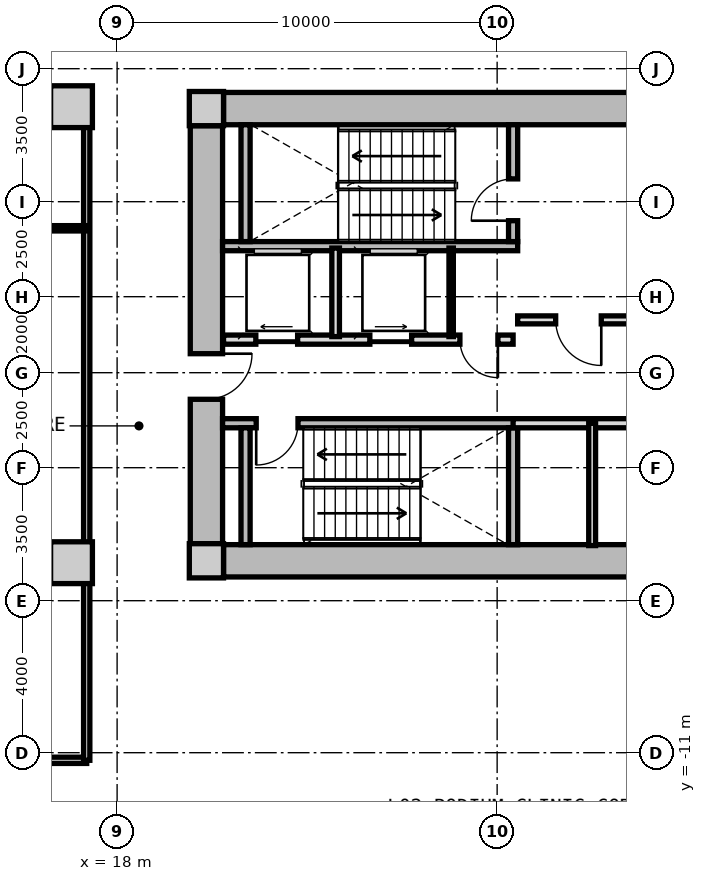
"""IFC4 building model, lengths in metres.
Left out: names, types, materials, properties, quantities, classifications, styles, units other than length and angle.
Written with IfcOpenShell. Run it as: python <this file> out.ifc"""

import sys

from ifc_helpers import new_model, si_unit, direction, frame, frame_2d, origin, origin_2d, place, context, subcontext, project, spatial, rectangle, extrude, source, transform, mapped, element, fill, save


model = new_model("IFC4")
c1 = context("Model", 3, precision=1e-05, world=origin(), true_north=direction((0.0, 1.0)))
c2 = subcontext(c1, "Body", "Model", "MODEL_VIEW")
j1 = project(units=[si_unit("LENGTHUNIT", "METRE"), si_unit("PLANEANGLEUNIT", "RADIAN")], contexts=[c1])
p1 = place(None, origin())
s1 = spatial("IfcSite", under=j1, at=p1, CompositionType="ELEMENT")
p2 = place(p1, origin())
s2 = spatial("IfcBuilding", under=s1, at=p2, CompositionType="ELEMENT")
p3 = place(p2, frame((0.0, 0.0, 8.4)))
s3 = spatial("IfcBuildingStorey", under=s2, at=p3, CompositionType="ELEMENT", Elevation=8.4)
m1 = source(origin(), c2, "Body", "SweptSolid", [
    extrude(rectangle(XDim=0.9, YDim=0.9, at=origin_2d()), origin(), (0.0, 0.0, 1.0), 4.2),
])
for number, where, z_axis, x_axis in (
    (1, (20.35, -5.95, 0.0), (0.0, 0.0, 1.0), (1.0, 0.0, 0.0)),
    (2, (20.35, 5.95, 0.0), (0.0, 0.0, 1.0), (1.0, 0.0, 0.0)),
):
    element("IfcColumn", number, at=place(p3, frame(where, z_axis=z_axis, x_axis=x_axis)), inside=s3, PredefinedType="COLUMN", context=c2, shape_type="MappedRepresentation", body=[
        mapped(m1, transform((0.0, 0.0, 0.0), x_axis=(1.0, 0.0, 0.0), y_axis=(0.0, 1.0, 0.0), z_axis=(0.0, 0.0, 1.0), scale=1.0)),
    ])
m2 = source(origin(), c2, "Body", "SweptSolid", [
    extrude(rectangle(XDim=14.4, YDim=0.85, at=frame_2d((7.2, 0.0))), origin(), (0.0, 0.0, 1.0), 3.88),
])
for number, where, z_axis, x_axis in (
    (3, (20.8, 5.95, 0.0), (0.0, 0.0, 1.0), (1.0, 0.0, 0.0)),
    (4, (35.2, -5.95, 0.0), (0.0, 0.0, 1.0), (-1.0, 0.0, 0.0)),
):
    element("IfcWall", number, at=place(p3, frame(where, z_axis=z_axis, x_axis=x_axis)), inside=s3, PredefinedType="SHEAR", context=c2, shape_type="MappedRepresentation", body=[
        mapped(m2, transform((0.0, 0.0, 0.0), x_axis=(1.0, 0.0, 0.0), y_axis=(0.0, 1.0, 0.0), z_axis=(0.0, 0.0, 1.0), scale=1.0)),
    ])
m3 = source(origin(), c2, "Body", "SweptSolid", [
    extrude(rectangle(XDim=11.0, YDim=0.85, at=frame_2d((5.5, 0.0))), origin(), (0.0, 0.0, 1.0), 3.88),
])
p4 = place(p3, frame((20.35, -5.5, 0.0), z_axis=(0.0, 0.0, 1.0), x_axis=(0.0, 1.0, 0.0)))
e5 = element("IfcWall", 5, at=p4, inside=s3, PredefinedType="SHEAR", context=c2, shape_type="MappedRepresentation", body=[
    mapped(m3, transform((0.0, 0.0, 0.0), x_axis=(1.0, 0.0, 0.0), y_axis=(0.0, 1.0, 0.0), z_axis=(0.0, 0.0, 1.0), scale=1.0)),
])
p5 = place(p4, frame((3.8, 0.0, 0.0)))
e6 = element("IfcOpeningElement", 6, at=p5, cuts=e5, PredefinedType="OPENING", context=c2, shape_type="SweptSolid", body=[
    extrude(rectangle(XDim=1.2, YDim=2.15, at=frame_2d((0.6, 1.075))), frame((0.0, 0.435, 0.0), z_axis=(0.0, -1.0, 0.0), x_axis=(1.0, 0.0, 0.0)), (0.0, 0.0, 1.0), 0.87),
])
m4 = source(origin(), c2, "Body", "SweptSolid", [
    extrude(rectangle(XDim=1.1, YDim=1.1, at=origin_2d()), origin(), (0.0, 0.0, 1.0), 4.2),
])
for number, where, z_axis, x_axis in (
    (7, (16.8, -6.0, 0.0), (0.0, 0.0, 1.0), (1.0, 0.0, 0.0)),
    (8, (16.8, 6.0, 0.0), (0.0, 0.0, 1.0), (1.0, 0.0, 0.0)),
):
    element("IfcColumn", number, at=place(p3, frame(where, z_axis=z_axis, x_axis=x_axis)), inside=s3, PredefinedType="COLUMN", context=c2, shape_type="MappedRepresentation", body=[
        mapped(m4, transform((0.0, 0.0, 0.0), x_axis=(1.0, 0.0, 0.0), y_axis=(0.0, 1.0, 0.0), z_axis=(0.0, 0.0, 1.0), scale=1.0)),
    ])
m5 = source(origin(), c2, "Body", "SweptSolid", [
    extrude(rectangle(XDim=7.765, YDim=0.24, at=frame_2d((3.883, 0.0))), origin(), (0.0, 0.0, 1.0), 3.88),
])
p6 = place(p3, frame((20.775, 2.33, 0.0), z_axis=(0.0, 0.0, 1.0), x_axis=(1.0, 0.0, 0.0)))
e9 = element("IfcWall", 9, at=p6, inside=s3, PredefinedType="PARTITIONING", context=c2, shape_type="MappedRepresentation", body=[
    mapped(m5, transform((0.0, 0.0, 0.0), x_axis=(1.0, 0.0, 0.0), y_axis=(0.0, 1.0, 0.0), z_axis=(0.0, 0.0, 1.0), scale=1.0)),
])
m6 = source(origin(), c2, "Body", "SweptSolid", [
    extrude(rectangle(XDim=3.075, YDim=0.24, at=frame_2d((1.538, 0.0))), origin(), (0.0, 0.0, 1.0), 3.88),
])
p7 = place(p3, frame((21.38, 2.45, 0.0), z_axis=(0.0, 0.0, 1.0), x_axis=(0.0, 1.0, 0.0)))
e10 = element("IfcWall", 10, at=p7, inside=s3, PredefinedType="PARTITIONING", context=c2, shape_type="MappedRepresentation", body=[
    mapped(m6, transform((0.0, 0.0, 0.0), x_axis=(1.0, 0.0, 0.0), y_axis=(0.0, 1.0, 0.0), z_axis=(0.0, 0.0, 1.0), scale=1.0)),
])
p8 = place(p3, frame((28.42, 2.45, 0.0), z_axis=(0.0, 0.0, 1.0), x_axis=(0.0, 1.0, 0.0)))
e11 = element("IfcWall", 11, at=p8, inside=s3, PredefinedType="PARTITIONING", context=c2, shape_type="MappedRepresentation", body=[
    mapped(m6, transform((0.0, 0.0, 0.0), x_axis=(1.0, 0.0, 0.0), y_axis=(0.0, 1.0, 0.0), z_axis=(0.0, 0.0, 1.0), scale=1.0)),
])
p9 = place(p8, frame((0.55, 0.0, 0.0)))
e12 = element("IfcOpeningElement", 12, at=p9, cuts=e11, PredefinedType="OPENING", context=c2, shape_type="SweptSolid", body=[
    extrude(rectangle(XDim=1.1, YDim=2.15, at=frame_2d((0.55, 1.075))), frame((0.0, 0.13, 0.0), z_axis=(0.0, -1.0, 0.0), x_axis=(1.0, 0.0, 0.0)), (0.0, 0.0, 1.0), 0.26),
])
p10 = place(p3, frame((20.775, -2.33, 0.0), z_axis=(0.0, 0.0, 1.0), x_axis=(1.0, 0.0, 0.0)))
e13 = element("IfcWall", 13, at=p10, inside=s3, PredefinedType="PARTITIONING", context=c2, shape_type="MappedRepresentation", body=[
    mapped(m5, transform((0.0, 0.0, 0.0), x_axis=(1.0, 0.0, 0.0), y_axis=(0.0, 1.0, 0.0), z_axis=(0.0, 0.0, 1.0), scale=1.0)),
])
p11 = place(p10, frame((0.885, 0.0, 0.0)))
e14 = element("IfcOpeningElement", 14, at=p11, cuts=e13, PredefinedType="OPENING", context=c2, shape_type="SweptSolid", body=[
    extrude(rectangle(XDim=1.1, YDim=2.15, at=frame_2d((0.55, 1.075))), frame((0.0, 0.13, 0.0), z_axis=(0.0, -1.0, 0.0), x_axis=(1.0, 0.0, 0.0)), (0.0, 0.0, 1.0), 0.26),
])
for number, where, z_axis, x_axis in (
    (15, (21.38, -5.525, 0.0), (0.0, 0.0, 1.0), (0.0, 1.0, 0.0)),
    (16, (28.42, -5.525, 0.0), (0.0, 0.0, 1.0), (0.0, 1.0, 0.0)),
):
    element("IfcWall", number, at=place(p3, frame(where, z_axis=z_axis, x_axis=x_axis)), inside=s3, PredefinedType="PARTITIONING", context=c2, shape_type="MappedRepresentation", body=[
        mapped(m6, transform((0.0, 0.0, 0.0), x_axis=(1.0, 0.0, 0.0), y_axis=(0.0, 1.0, 0.0), z_axis=(0.0, 0.0, 1.0), scale=1.0)),
    ])
m7 = source(origin(), c2, "Body", "SweptSolid", [
    extrude(rectangle(XDim=6.66, YDim=0.21, at=frame_2d((3.33, 0.0))), origin(), (0.0, 0.0, 1.0), 3.865),
])
p12 = place(p3, frame((28.54, 0.39, 0.0), z_axis=(0.0, 0.0, 1.0), x_axis=(1.0, 0.0, 0.0)))
e17 = element("IfcWall", 17, at=p12, inside=s3, PredefinedType="PARTITIONING", context=c2, shape_type="MappedRepresentation", body=[
    mapped(m7, transform((0.0, 0.0, 0.0), x_axis=(1.0, 0.0, 0.0), y_axis=(0.0, 1.0, 0.0), z_axis=(0.0, 0.0, 1.0), scale=1.0)),
])
p13 = place(p12, frame((1.0, 0.0, 0.0)))
e18 = element("IfcOpeningElement", 18, at=p13, cuts=e17, PredefinedType="OPENING", context=c2, shape_type="SweptSolid", body=[
    extrude(rectangle(XDim=1.2, YDim=2.15, at=frame_2d((0.6, 1.075))), frame((0.0, 0.115, 0.0), z_axis=(0.0, -1.0, 0.0), x_axis=(1.0, 0.0, 0.0)), (0.0, 0.0, 1.0), 0.23),
])
m8 = source(origin(), c2, "Body", "SweptSolid", [
    extrude(rectangle(XDim=7.62, YDim=0.24, at=frame_2d((3.81, 0.0))), origin(), (0.0, 0.0, 1.0), 3.865),
])
p14 = place(p3, frame((20.8, -0.13, 0.0), z_axis=(0.0, 0.0, 1.0), x_axis=(1.0, 0.0, 0.0)))
e19 = element("IfcWall", 19, at=p14, inside=s3, PredefinedType="PARTITIONING", context=c2, shape_type="MappedRepresentation", body=[
    mapped(m8, transform((0.0, 0.0, 0.0), x_axis=(1.0, 0.0, 0.0), y_axis=(0.0, 1.0, 0.0), z_axis=(0.0, 0.0, 1.0), scale=1.0)),
])
p15 = place(p14, frame((6.22, 0.0, 0.0)))
e20 = element("IfcOpeningElement", 20, at=p15, cuts=e19, PredefinedType="OPENING", context=c2, shape_type="SweptSolid", body=[
    extrude(rectangle(XDim=1.0, YDim=2.1, at=frame_2d((0.5, 1.05))), frame((0.0, 0.13, 0.0), z_axis=(0.0, -1.0, 0.0), x_axis=(1.0, 0.0, 0.0)), (0.0, 0.0, 1.0), 0.26),
])
p16 = place(p14, frame((0.85, 0.0, 0.0)))
e21 = element("IfcOpeningElement", 21, at=p16, cuts=e19, PredefinedType="OPENING", context=c2, shape_type="SweptSolid", body=[
    extrude(rectangle(XDim=1.1, YDim=2.2, at=frame_2d((0.55, 1.1))), frame((0.0, 0.13, 0.0), z_axis=(0.0, -1.0, 0.0), x_axis=(1.0, 0.0, 0.0)), (0.0, 0.0, 1.0), 0.26),
])
p17 = place(p14, frame((3.85, 0.0, 0.0)))
e22 = element("IfcOpeningElement", 22, at=p17, cuts=e19, PredefinedType="OPENING", context=c2, shape_type="SweptSolid", body=[
    extrude(rectangle(XDim=1.1, YDim=2.2, at=frame_2d((0.55, 1.1))), frame((0.0, 0.13, 0.0), z_axis=(0.0, -1.0, 0.0), x_axis=(1.0, 0.0, 0.0)), (0.0, 0.0, 1.0), 0.26),
])
m9 = source(origin(), c2, "Body", "SweptSolid", [
    extrude(rectangle(XDim=2.33, YDim=0.115, at=frame_2d((1.165, 0.0))), origin(), (0.0, 0.0, 1.0), 3.865),
])
p18 = place(p3, frame((26.79, -0.05, 0.0), z_axis=(0.0, 0.0, 1.0), x_axis=(0.0, 1.0, 0.0)))
e23 = element("IfcWall", 23, at=p18, inside=s3, PredefinedType="PARTITIONING", context=c2, shape_type="MappedRepresentation", body=[
    mapped(m9, transform((0.0, 0.0, 0.0), x_axis=(1.0, 0.0, 0.0), y_axis=(0.0, 1.0, 0.0), z_axis=(0.0, 0.0, 1.0), scale=1.0)),
])
m10 = source(origin(), c2, "Body", "SweptSolid", [
    extrude(rectangle(XDim=2.33, YDim=0.2, at=frame_2d((1.165, 0.0))), origin(), (0.0, 0.0, 1.0), 3.865),
])
p19 = place(p3, frame((23.75, -0.05, 0.0), z_axis=(0.0, 0.0, 1.0), x_axis=(0.0, 1.0, 0.0)))
e24 = element("IfcWall", 24, at=p19, inside=s3, PredefinedType="PARTITIONING", context=c2, shape_type="MappedRepresentation", body=[
    mapped(m10, transform((0.0, 0.0, 0.0), x_axis=(1.0, 0.0, 0.0), y_axis=(0.0, 1.0, 0.0), z_axis=(0.0, 0.0, 1.0), scale=1.0)),
])
m11 = source(origin(), c2, "Body", "SweptSolid", [
    extrude(rectangle(XDim=4.13, YDim=0.24, at=frame_2d((2.065, 0.0))), origin(), (0.0, 0.0, 1.0), 3.865),
])
p20 = place(p3, frame((28.42, -2.33, 0.0), z_axis=(0.0, 0.0, 1.0), x_axis=(1.0, 0.0, 0.0)))
e25 = element("IfcWall", 25, at=p20, inside=s3, PredefinedType="PARTITIONING", context=c2, shape_type="MappedRepresentation", body=[
    mapped(m11, transform((0.0, 0.0, 0.0), x_axis=(1.0, 0.0, 0.0), y_axis=(0.0, 1.0, 0.0), z_axis=(0.0, 0.0, 1.0), scale=1.0)),
])
m12 = source(origin(), c2, "Body", "SweptSolid", [
    extrude(rectangle(XDim=3.22, YDim=0.18, at=frame_2d((1.61, 0.0))), origin(), (0.0, 0.0, 1.0), 3.865),
])
p21 = place(p3, frame((30.5, -5.55, 0.0), z_axis=(0.0, 0.0, 1.0), x_axis=(0.0, 1.0, 0.0)))
e26 = element("IfcWall", 26, at=p21, inside=s3, PredefinedType="PARTITIONING", context=c2, shape_type="MappedRepresentation", body=[
    mapped(m12, transform((0.0, 0.0, 0.0), x_axis=(1.0, 0.0, 0.0), y_axis=(0.0, 1.0, 0.0), z_axis=(0.0, 0.0, 1.0), scale=1.0)),
])
m13 = source(origin(), c2, "Body", "SweptSolid", [
    extrude(rectangle(XDim=34.4, YDim=0.165, at=frame_2d((17.2, 0.0))), origin(), (0.0, 0.0, 1.0), 3.865),
])
p22 = place(p3, frame((-17.2, -11.2, 0.0), z_axis=(0.0, 0.0, 1.0), x_axis=(1.0, 0.0, 0.0)))
e27 = element("IfcWall", 27, at=p22, inside=s3, PredefinedType="PARTITIONING", context=c2, shape_type="MappedRepresentation", body=[
    mapped(m13, transform((0.0, 0.0, 0.0), x_axis=(1.0, 0.0, 0.0), y_axis=(0.0, 1.0, 0.0), z_axis=(0.0, 0.0, 1.0), scale=1.0)),
])
p23 = place(p22, frame((4.2, 0.0, 0.0)))
e28 = element("IfcOpeningElement", 28, at=p23, cuts=e27, PredefinedType="OPENING", context=c2, shape_type="SweptSolid", body=[
    extrude(rectangle(XDim=1.25, YDim=2.2, at=frame_2d((0.625, 1.1))), frame((0.0, 0.093, 0.0), z_axis=(0.0, -1.0, 0.0), x_axis=(1.0, 0.0, 0.0)), (0.0, 0.0, 1.0), 0.185),
])
p24 = place(p22, frame((16.1, 0.0, 0.0)))
e29 = element("IfcOpeningElement", 29, at=p24, cuts=e27, PredefinedType="OPENING", context=c2, shape_type="SweptSolid", body=[
    extrude(rectangle(XDim=2.2, YDim=2.4, at=frame_2d((1.1, 1.2))), frame((0.0, 0.093, 0.0), z_axis=(0.0, -1.0, 0.0), x_axis=(1.0, 0.0, 0.0)), (0.0, 0.0, 1.0), 0.185),
])
p25 = place(p22, frame((27.5, 0.0, 0.0)))
e30 = element("IfcOpeningElement", 30, at=p25, cuts=e27, PredefinedType="OPENING", context=c2, shape_type="SweptSolid", body=[
    extrude(rectangle(XDim=1.25, YDim=2.2, at=frame_2d((0.625, 1.1))), frame((0.0, 0.093, 0.0), z_axis=(0.0, -1.0, 0.0), x_axis=(1.0, 0.0, 0.0)), (0.0, 0.0, 1.0), 0.185),
])
p26 = place(p3, frame((-17.2, 6.4, 0.0), z_axis=(0.0, 0.0, 1.0), x_axis=(1.0, 0.0, 0.0)))
e31 = element("IfcWall", 31, at=p26, inside=s3, PredefinedType="PARTITIONING", context=c2, shape_type="MappedRepresentation", body=[
    mapped(m13, transform((0.0, 0.0, 0.0), x_axis=(1.0, 0.0, 0.0), y_axis=(0.0, 1.0, 0.0), z_axis=(0.0, 0.0, 1.0), scale=1.0)),
])
p27 = place(p26, frame((4.2, 0.0, 0.0)))
e32 = element("IfcOpeningElement", 32, at=p27, cuts=e31, PredefinedType="OPENING", context=c2, shape_type="SweptSolid", body=[
    extrude(rectangle(XDim=1.25, YDim=2.2, at=frame_2d((0.625, 1.1))), frame((0.0, 0.093, 0.0), z_axis=(0.0, -1.0, 0.0), x_axis=(1.0, 0.0, 0.0)), (0.0, 0.0, 1.0), 0.185),
])
p28 = place(p26, frame((25.5, 0.0, 0.0)))
e33 = element("IfcOpeningElement", 33, at=p28, cuts=e31, PredefinedType="OPENING", context=c2, shape_type="SweptSolid", body=[
    extrude(rectangle(XDim=0.92, YDim=2.1, at=frame_2d((0.46, 1.05))), frame((0.0, 0.093, 0.0), z_axis=(0.0, -1.0, 0.0), x_axis=(1.0, 0.0, 0.0)), (0.0, 0.0, 1.0), 0.185),
])
p29 = place(p26, frame((31.0, 0.0, 0.0)))
e34 = element("IfcOpeningElement", 34, at=p29, cuts=e31, PredefinedType="OPENING", context=c2, shape_type="SweptSolid", body=[
    extrude(rectangle(XDim=0.92, YDim=2.1, at=frame_2d((0.46, 1.05))), frame((0.0, 0.093, 0.0), z_axis=(0.0, -1.0, 0.0), x_axis=(1.0, 0.0, 0.0)), (0.0, 0.0, 1.0), 0.185),
])
m14 = source(origin(), c2, "Body", "SweptSolid", [
    extrude(rectangle(XDim=17.6, YDim=0.165, at=frame_2d((8.8, 0.0))), origin(), (0.0, 0.0, 1.0), 3.865),
])
p30 = place(p3, frame((17.2, -11.2, 0.0), z_axis=(0.0, 0.0, 1.0), x_axis=(0.0, 1.0, 0.0)))
e35 = element("IfcWall", 35, at=p30, inside=s3, PredefinedType="PARTITIONING", context=c2, shape_type="MappedRepresentation", body=[
    mapped(m14, transform((0.0, 0.0, 0.0), x_axis=(1.0, 0.0, 0.0), y_axis=(0.0, 1.0, 0.0), z_axis=(0.0, 0.0, 1.0), scale=1.0)),
])
m15 = source(origin(), c2, "Body", "SweptSolid", [
    extrude(rectangle(XDim=10.7, YDim=0.14, at=frame_2d((5.35, 0.0))), origin(), (0.0, 0.0, 1.0), 3.865),
])
p31 = place(p3, frame((6.5, 2.8, 0.0), z_axis=(0.0, 0.0, 1.0), x_axis=(1.0, 0.0, 0.0)))
e36 = element("IfcWall", 36, at=p31, inside=s3, PredefinedType="PARTITIONING", context=c2, shape_type="MappedRepresentation", body=[
    mapped(m15, transform((0.0, 0.0, 0.0), x_axis=(1.0, 0.0, 0.0), y_axis=(0.0, 1.0, 0.0), z_axis=(0.0, 0.0, 1.0), scale=1.0)),
])
m16 = source(origin(), c2, "Body", "SweptSolid", [
    extrude(rectangle(XDim=1.1, YDim=2.15, at=frame_2d((0.55, 1.075))), frame((0.0, 0.025, 0.0), z_axis=(0.0, -1.0, 0.0), x_axis=(1.0, 0.0, 0.0)), (0.0, 0.0, 1.0), 0.05),
])
p32 = place(p9, origin())
e37 = element("IfcDoor", 37, at=p32, inside=s3, OperationType="SINGLE_SWING_LEFT", PredefinedType="DOOR", context=c2, shape_type="MappedRepresentation", body=[
    mapped(m16, transform((0.0, 0.0, 0.0), x_axis=(1.0, 0.0, 0.0), y_axis=(0.0, 1.0, 0.0), z_axis=(0.0, 0.0, 1.0), scale=1.0)),
])
fill(e12, e37)
p33 = place(p11, frame((1.1, 0.0, 0.0), z_axis=(0.0, 0.0, 1.0), x_axis=(-1.0, 0.0, 0.0)))
e38 = element("IfcDoor", 38, at=p33, inside=s3, OperationType="SINGLE_SWING_RIGHT", PredefinedType="DOOR", context=c2, shape_type="MappedRepresentation", body=[
    mapped(m16, transform((0.0, 0.0, 0.0), x_axis=(1.0, 0.0, 0.0), y_axis=(0.0, 1.0, 0.0), z_axis=(0.0, 0.0, 1.0), scale=1.0)),
])
fill(e14, e38)
m17 = source(origin(), c2, "Body", "SweptSolid", [
    extrude(rectangle(XDim=1.2, YDim=2.15, at=frame_2d((0.6, 1.075))), frame((0.0, 0.025, 0.0), z_axis=(0.0, -1.0, 0.0), x_axis=(1.0, 0.0, 0.0)), (0.0, 0.0, 1.0), 0.05),
])
p34 = place(p13, frame((1.2, 0.0, 0.0), z_axis=(0.0, 0.0, 1.0), x_axis=(-1.0, 0.0, 0.0)))
e39 = element("IfcDoor", 39, at=p34, inside=s3, OperationType="SINGLE_SWING_LEFT", PredefinedType="DOOR", context=c2, shape_type="MappedRepresentation", body=[
    mapped(m17, transform((0.0, 0.0, 0.0), x_axis=(1.0, 0.0, 0.0), y_axis=(0.0, 1.0, 0.0), z_axis=(0.0, 0.0, 1.0), scale=1.0)),
])
fill(e18, e39)
p35 = place(p5, frame((1.2, 0.0, 0.0), z_axis=(0.0, 0.0, 1.0), x_axis=(-1.0, 0.0, 0.0)))
e40 = element("IfcDoor", 40, at=p35, inside=s3, OperationType="SINGLE_SWING_LEFT", PredefinedType="DOOR", context=c2, shape_type="MappedRepresentation", body=[
    mapped(m17, transform((0.0, 0.0, 0.0), x_axis=(1.0, 0.0, 0.0), y_axis=(0.0, 1.0, 0.0), z_axis=(0.0, 0.0, 1.0), scale=1.0)),
])
fill(e6, e40)
m18 = source(origin(), c2, "Body", "SweptSolid", [
    extrude(rectangle(XDim=1.0, YDim=2.1, at=frame_2d((0.5, 1.05))), frame((0.0, 0.025, 0.0), z_axis=(0.0, -1.0, 0.0), x_axis=(1.0, 0.0, 0.0)), (0.0, 0.0, 1.0), 0.05),
])
p36 = place(p15, frame((1.0, 0.0, 0.0), z_axis=(0.0, 0.0, 1.0), x_axis=(-1.0, 0.0, 0.0)))
e41 = element("IfcDoor", 41, at=p36, inside=s3, OperationType="SINGLE_SWING_LEFT", PredefinedType="DOOR", context=c2, shape_type="MappedRepresentation", body=[
    mapped(m18, transform((0.0, 0.0, 0.0), x_axis=(1.0, 0.0, 0.0), y_axis=(0.0, 1.0, 0.0), z_axis=(0.0, 0.0, 1.0), scale=1.0)),
])
fill(e20, e41)
m19 = source(origin(), c2, "Body", "SweptSolid", [
    extrude(rectangle(XDim=1.1, YDim=2.2, at=frame_2d((0.55, 1.1))), frame((0.0, 0.025, 0.0), z_axis=(0.0, -1.0, 0.0), x_axis=(1.0, 0.0, 0.0)), (0.0, 0.0, 1.0), 0.05),
])
p37 = place(p16, origin())
e42 = element("IfcDoor", 42, at=p37, inside=s3, OperationType="SLIDING_TO_LEFT", PredefinedType="DOOR", context=c2, shape_type="MappedRepresentation", body=[
    mapped(m19, transform((0.0, 0.0, 0.0), x_axis=(1.0, 0.0, 0.0), y_axis=(0.0, 1.0, 0.0), z_axis=(0.0, 0.0, 1.0), scale=1.0)),
])
fill(e21, e42)
p38 = place(p17, origin())
e43 = element("IfcDoor", 43, at=p38, inside=s3, OperationType="SLIDING_TO_RIGHT", PredefinedType="DOOR", context=c2, shape_type="MappedRepresentation", body=[
    mapped(m19, transform((0.0, 0.0, 0.0), x_axis=(1.0, 0.0, 0.0), y_axis=(0.0, 1.0, 0.0), z_axis=(0.0, 0.0, 1.0), scale=1.0)),
])
fill(e22, e43)
save(model, sys.argv[1])
